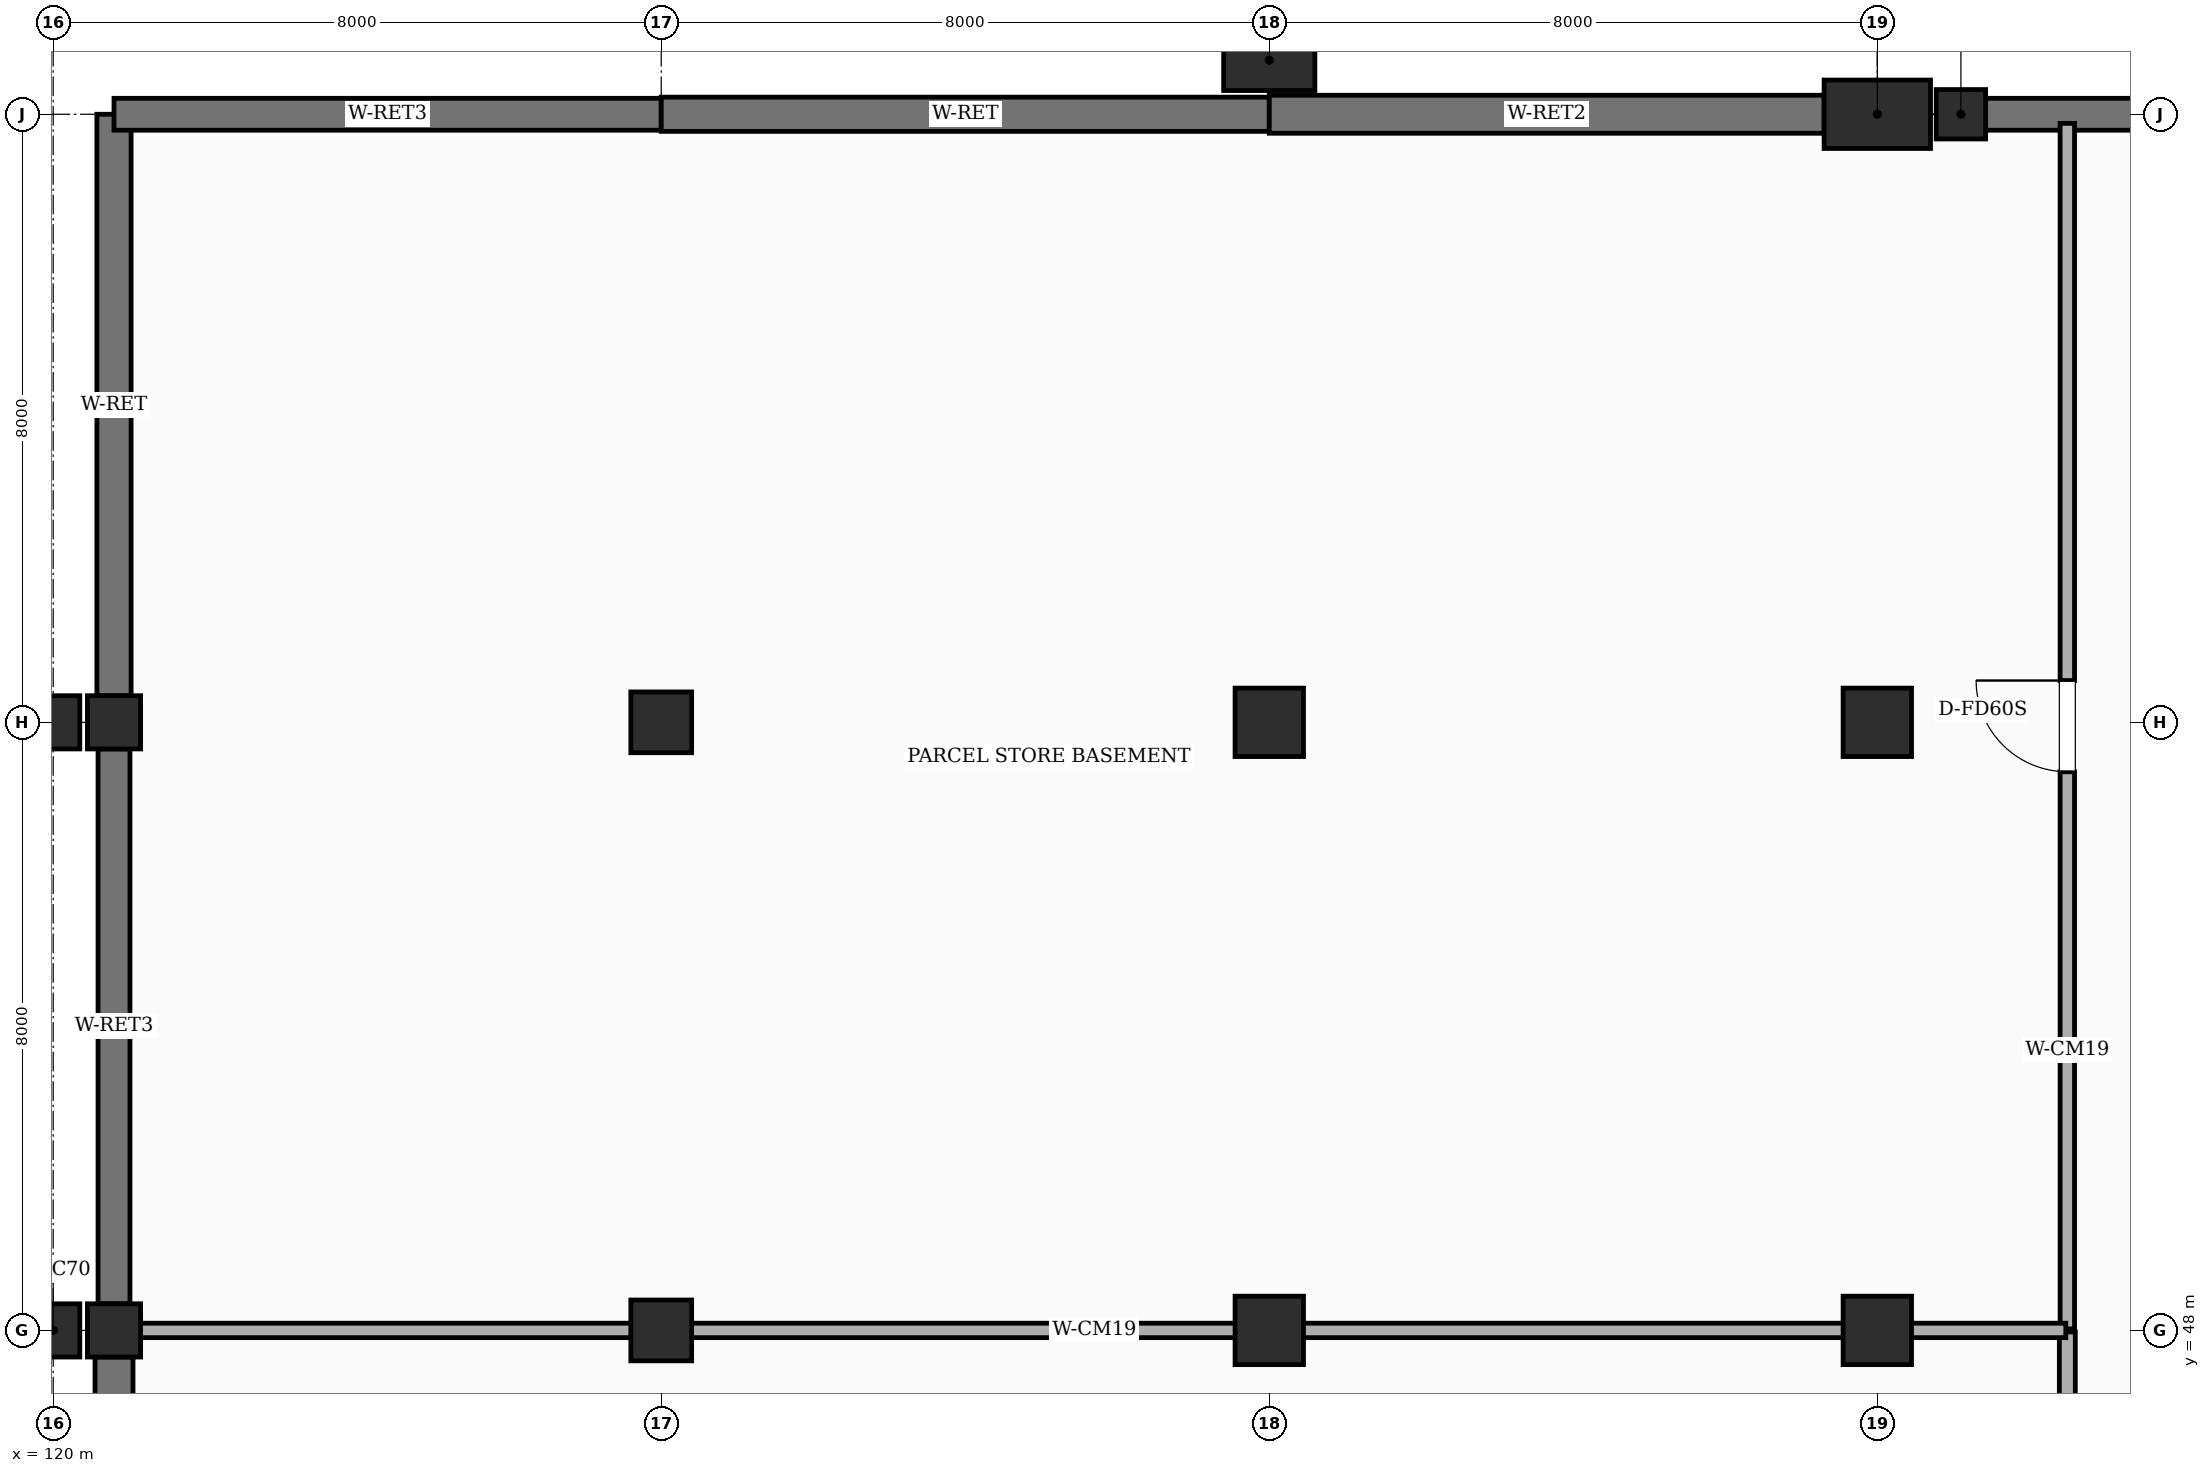
"""IFC4 building model, lengths in metres.
Left out: names, types, materials, properties, quantities, classifications, styles, units other than length and angle.
Written with IfcOpenShell. Run it as: python <this file> out.ifc"""

import sys

from ifc_helpers import new_model, si_unit, direction, frame, frame_2d, origin, origin_2d, place, context, subcontext, project, spatial, rectangle, extrude, element, fill, save


model = new_model("IFC4")
c1 = context("Model", 3, precision=1e-05, world=origin(), true_north=direction((0.0, 1.0)))
c2 = subcontext(c1, "Body", "Model", "MODEL_VIEW")
j1 = project(units=[si_unit("LENGTHUNIT", "METRE"), si_unit("PLANEANGLEUNIT", "RADIAN")], contexts=[c1])
p1 = place(None, origin())
s1 = spatial("IfcSite", under=j1, at=p1, CompositionType="ELEMENT")
p2 = place(p1, origin())
s2 = spatial("IfcBuilding", under=s1, at=p2, CompositionType="ELEMENT")
p3 = place(p2, frame((0.0, 0.0, -5.4)))
s3 = spatial("IfcBuildingStorey", under=s2, at=p3, CompositionType="ELEMENT", Elevation=-5.4)
p4 = place(p3, frame((136.0, 64.712, -0.4), z_axis=(0.0, 0.0, 1.0), x_axis=(1.0, 0.0, 0.0)))
e1 = element("IfcColumn", 1, at=p4, inside=s3, PredefinedType="COLUMN", context=c2, shape_type="SweptSolid", body=[
    extrude(rectangle(XDim=1.2, YDim=0.8, at=origin_2d()), origin(), (0.0, 0.0, 1.0), 5.8),
])
p5 = place(p3, frame((144.0, 64.0, -0.4), z_axis=(0.0, 0.0, 1.0), x_axis=(1.0, 0.0, 0.0)))
e2 = element("IfcColumn", 2, at=p5, inside=s3, PredefinedType="COLUMN", context=c2, shape_type="SweptSolid", body=[
    extrude(rectangle(XDim=1.4, YDim=0.9, at=origin_2d()), origin(), (0.0, 0.0, 1.0), 5.8),
])
for number, where, z_axis, x_axis in (
    (3, (120.0, 48.0, -0.4), (0.0, 0.0, 1.0), (1.0, 0.0, 0.0)),
    (4, (120.0, 56.0, -0.4), (0.0, 0.0, 1.0), (1.0, 0.0, 0.0)),
    (5, (120.8, 48.0, -0.4), (0.0, 0.0, 1.0), (1.0, 0.0, 0.0)),
    (6, (120.8, 56.0, -0.4), (0.0, 0.0, 1.0), (1.0, 0.0, 0.0)),
):
    element("IfcColumn", number, at=place(p3, frame(where, z_axis=z_axis, x_axis=x_axis)), inside=s3, PredefinedType="COLUMN", context=c2, shape_type="SweptSolid", body=[
        extrude(rectangle(XDim=0.7, YDim=0.7, at=origin_2d()), origin(), (0.0, 0.0, 1.0), 5.8),
    ])
for number, where, z_axis, x_axis in (
    (7, (128.0, 48.0, -0.4), (0.0, 0.0, 1.0), (1.0, 0.0, 0.0)),
    (8, (128.0, 56.0, -0.4), (0.0, 0.0, 1.0), (1.0, 0.0, 0.0)),
):
    element("IfcColumn", number, at=place(p3, frame(where, z_axis=z_axis, x_axis=x_axis)), inside=s3, PredefinedType="COLUMN", context=c2, shape_type="SweptSolid", body=[
        extrude(rectangle(XDim=0.8, YDim=0.8, at=origin_2d()), origin(), (0.0, 0.0, 1.0), 5.8),
    ])
for number, where, z_axis, x_axis in (
    (9, (136.0, 48.0, -0.4), (0.0, 0.0, 1.0), (1.0, 0.0, 0.0)),
    (10, (136.0, 56.0, -0.4), (0.0, 0.0, 1.0), (1.0, 0.0, 0.0)),
    (11, (144.0, 48.0, -0.4), (0.0, 0.0, 1.0), (1.0, 0.0, 0.0)),
    (12, (144.0, 56.0, -0.4), (0.0, 0.0, 1.0), (1.0, 0.0, 0.0)),
):
    element("IfcColumn", number, at=place(p3, frame(where, z_axis=z_axis, x_axis=x_axis)), inside=s3, PredefinedType="COLUMN", context=c2, shape_type="SweptSolid", body=[
        extrude(rectangle(XDim=0.9, YDim=0.9, at=origin_2d()), origin(), (0.0, 0.0, 1.0), 5.8),
    ])
p6 = place(p3, frame((145.1, 64.0, -0.4), z_axis=(0.0, 0.0, 1.0), x_axis=(1.0, 0.0, 0.0)))
e13 = element("IfcColumn", 13, at=p6, inside=s3, PredefinedType="COLUMN", context=c2, shape_type="SweptSolid", body=[
    extrude(rectangle(XDim=0.65, YDim=0.65, at=origin_2d()), origin(), (0.0, 0.0, 1.0), 5.8),
])
p7 = place(p3, frame((120.8, 40.35, 0.0), z_axis=(0.0, 0.0, 1.0), x_axis=(0.0, 1.0, 0.0)))
e14 = element("IfcWall", 14, at=p7, inside=s3, PredefinedType="USERDEFINED", context=c2, shape_type="SweptSolid", body=[
    extrude(rectangle(XDim=7.3, YDim=0.5, at=frame_2d((3.65, 0.0))), origin(), (0.0, 0.0, 1.0), 4.4),
])
p8 = place(p3, frame((120.8, 48.35, 0.0), z_axis=(0.0, 0.0, 1.0), x_axis=(0.0, 1.0, 0.0)))
e15 = element("IfcWall", 15, at=p8, inside=s3, PredefinedType="USERDEFINED", context=c2, shape_type="SweptSolid", body=[
    extrude(rectangle(XDim=7.3, YDim=0.42, at=frame_2d((3.65, 0.0))), origin(), (0.0, 0.0, 1.0), 4.4),
])
p9 = place(p3, frame((120.8, 56.35, 0.0), z_axis=(0.0, 0.0, 1.0), x_axis=(0.0, 1.0, 0.0)))
e16 = element("IfcWall", 16, at=p9, inside=s3, PredefinedType="USERDEFINED", context=c2, shape_type="SweptSolid", body=[
    extrude(rectangle(XDim=7.65, YDim=0.45, at=frame_2d((3.825, 0.0))), origin(), (0.0, 0.0, 1.0), 5.0),
])
p10 = place(p3, frame((120.8, 64.0, 0.0), z_axis=(0.0, 0.0, 1.0), x_axis=(1.0, 0.0, 0.0)))
e17 = element("IfcWall", 17, at=p10, inside=s3, PredefinedType="USERDEFINED", context=c2, shape_type="SweptSolid", body=[
    extrude(rectangle(XDim=7.2, YDim=0.42, at=frame_2d((3.6, 0.0))), origin(), (0.0, 0.0, 1.0), 5.0),
])
p11 = place(p3, frame((128.0, 64.0, 0.0), z_axis=(0.0, 0.0, 1.0), x_axis=(1.0, 0.0, 0.0)))
e18 = element("IfcWall", 18, at=p11, inside=s3, PredefinedType="USERDEFINED", context=c2, shape_type="SweptSolid", body=[
    extrude(rectangle(XDim=8.0, YDim=0.45, at=frame_2d((4.0, 0.0))), origin(), (0.0, 0.0, 1.0), 5.0),
])
p12 = place(p3, frame((136.0, 64.0, 0.0), z_axis=(0.0, 0.0, 1.0), x_axis=(1.0, 0.0, 0.0)))
e19 = element("IfcWall", 19, at=p12, inside=s3, PredefinedType="USERDEFINED", context=c2, shape_type="SweptSolid", body=[
    extrude(rectangle(XDim=7.3, YDim=0.5, at=frame_2d((3.65, 0.0))), origin(), (0.0, 0.0, 1.0), 5.0),
])
p13 = place(p3, frame((145.425, 64.0, 0.0), z_axis=(0.0, 0.0, 1.0), x_axis=(1.0, 0.0, 0.0)))
e20 = element("IfcWall", 20, at=p13, inside=s3, PredefinedType="USERDEFINED", context=c2, shape_type="SweptSolid", body=[
    extrude(rectangle(XDim=6.125, YDim=0.42, at=frame_2d((3.062, 0.0))), origin(), (0.0, 0.0, 1.0), 4.15),
])
p14 = place(p3, frame((146.5, 30.02, 0.0), z_axis=(0.0, 0.0, 1.0), x_axis=(0.0, 1.0, 0.0)))
e21 = element("IfcWall", 21, at=p14, inside=s3, PredefinedType="SOLIDWALL", context=c2, shape_type="SweptSolid", body=[
    extrude(rectangle(XDim=17.96, YDim=0.21, at=frame_2d((8.98, 0.0))), origin(), (0.0, 0.0, 1.0), 5.0),
])
p15 = place(p14, frame((8.33, 0.0, 0.0)))
e22 = element("IfcOpeningElement", 22, at=p15, cuts=e21, PredefinedType="OPENING", context=c2, shape_type="SweptSolid", body=[
    extrude(rectangle(XDim=1.3, YDim=2.2, at=frame_2d((0.65, 1.1))), frame((0.0, 0.115, 0.0), z_axis=(0.0, -1.0, 0.0), x_axis=(1.0, 0.0, 0.0)), (0.0, 0.0, 1.0), 0.23),
])
p16 = place(p3, frame((146.5, 48.02, 0.0), z_axis=(0.0, 0.0, 1.0), x_axis=(0.0, 1.0, 0.0)))
e23 = element("IfcWall", 23, at=p16, inside=s3, PredefinedType="SOLIDWALL", context=c2, shape_type="SweptSolid", body=[
    extrude(rectangle(XDim=15.86, YDim=0.19, at=frame_2d((7.93, 0.0))), origin(), (0.0, 0.0, 1.0), 4.15),
])
p17 = place(p16, frame((7.33, 0.0, 0.0)))
e24 = element("IfcOpeningElement", 24, at=p17, cuts=e23, PredefinedType="OPENING", context=c2, shape_type="SweptSolid", body=[
    extrude(rectangle(XDim=1.2, YDim=2.15, at=frame_2d((0.6, 1.075))), frame((0.0, 0.105, 0.0), z_axis=(0.0, -1.0, 0.0), x_axis=(1.0, 0.0, 0.0)), (0.0, 0.0, 1.0), 0.21),
])
p18 = place(p3, frame((120.92, 48.0, 0.0), z_axis=(0.0, 0.0, 1.0), x_axis=(1.0, 0.0, 0.0)))
e25 = element("IfcWall", 25, at=p18, inside=s3, PredefinedType="SOLIDWALL", context=c2, shape_type="SweptSolid", body=[
    extrude(rectangle(XDim=25.56, YDim=0.19, at=frame_2d((12.78, 0.0))), origin(), (0.0, 0.0, 1.0), 4.15),
])
p19 = place(p17, origin())
e26 = element("IfcDoor", 26, at=p19, inside=s3, OperationType="SINGLE_SWING_RIGHT", PredefinedType="DOOR", context=c2, shape_type="SweptSolid", body=[
    extrude(rectangle(XDim=1.2, YDim=2.15, at=frame_2d((0.6, 1.075))), frame((0.0, 0.025, 0.0), z_axis=(0.0, -1.0, 0.0), x_axis=(1.0, 0.0, 0.0)), (0.0, 0.0, 1.0), 0.05),
])
fill(e24, e26)
save(model, sys.argv[1])
